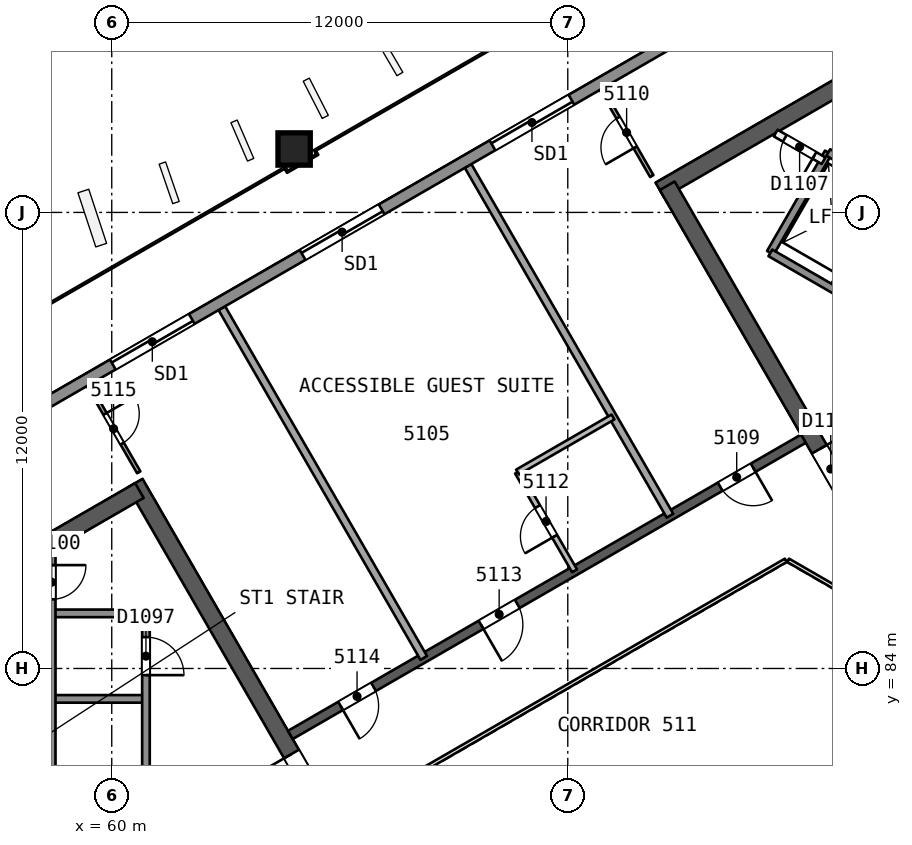
"""IFC4 building model, lengths in metres.
Left out: names, types, materials, properties, quantities, classifications, styles, units other than length and angle.
Written with IfcOpenShell. Run it as: python <this file> out.ifc"""

import sys

from ifc_helpers import new_model, si_unit, direction, frame, frame_2d, origin, origin_2d, place, context, subcontext, project, spatial, rectangle, extrude, element, fill, save


model = new_model("IFC4")
c1 = context("Model", 3, precision=1e-05, world=origin(), true_north=direction((0.0, 1.0)))
c2 = subcontext(c1, "Body", "Model", "MODEL_VIEW")
j1 = project(units=[si_unit("LENGTHUNIT", "METRE"), si_unit("PLANEANGLEUNIT", "RADIAN")], contexts=[c1])
p1 = place(None, origin())
s1 = spatial("IfcSite", under=j1, at=p1, CompositionType="ELEMENT")
p2 = place(p1, origin())
s2 = spatial("IfcBuilding", under=s1, at=p2, CompositionType="ELEMENT")
p3 = place(p2, frame((0.0, 0.0, 209.5)))
s3 = spatial("IfcBuildingStorey", under=s2, at=p3, CompositionType="ELEMENT", Elevation=209.5)
p4 = place(p3, frame((65.74, 80.0, 0.0), z_axis=(0.0, 0.0, 1.0), x_axis=(-0.499991857942, 0.866030104553, 0.0)))
e1 = element("IfcWall", 1, at=p4, inside=s3, PredefinedType="SHEAR", context=c2, shape_type="SweptSolid", body=[
    extrude(rectangle(XDim=10.25, YDim=0.45, at=frame_2d((5.125, 0.0))), origin(), (0.0, 0.0, 1.0), 3.7),
])
p5 = place(p4, frame((0.82, 0.0, 0.0)))
e2 = element("IfcOpeningElement", 2, at=p5, cuts=e1, PredefinedType="OPENING", context=c2, shape_type="SweptSolid", body=[
    extrude(rectangle(XDim=1.2, YDim=2.1, at=frame_2d((0.6, 1.05))), frame((0.0, 0.235, 0.0), z_axis=(0.0, -1.0, 0.0), x_axis=(1.0, 0.0, 0.0)), (0.0, 0.0, 1.0), 0.471),
])
p6 = place(p3, frame((60.728, 88.682, 0.0), z_axis=(0.0, 0.0, 1.0), x_axis=(-0.866021613849, -0.500006564303, 0.0)))
e3 = element("IfcWall", 3, at=p6, inside=s3, PredefinedType="SHEAR", context=c2, shape_type="SweptSolid", body=[
    extrude(rectangle(XDim=14.108, YDim=0.45, at=frame_2d((7.054, 0.0))), origin(), (0.0, 0.0, 1.0), 3.7),
])
p7 = place(p3, frame((86.723, 103.69, 0.0), z_axis=(0.0, 0.0, 1.0), x_axis=(-0.866022713978, -0.500004658852, 0.0)))
e4 = element("IfcWall", 4, at=p7, inside=s3, PredefinedType="SHEAR", context=c2, shape_type="SweptSolid", body=[
    extrude(rectangle(XDim=14.203, YDim=0.45, at=frame_2d((7.102, 0.0))), origin(), (0.0, 0.0, 1.0), 3.7),
])
p8 = place(p3, frame((74.617, 96.701, 0.0), z_axis=(0.0, 0.0, 1.0), x_axis=(0.499994385119, -0.866028645513, 0.0)))
e5 = element("IfcWall", 5, at=p8, inside=s3, PredefinedType="SHEAR", context=c2, shape_type="SweptSolid", body=[
    extrude(rectangle(XDim=10.155, YDim=0.45, at=frame_2d((5.077, 0.0))), origin(), (0.0, 0.0, 1.0), 3.7),
])
p9 = place(p8, frame((8.005, 0.0, 0.0)))
e6 = element("IfcOpeningElement", 6, at=p9, cuts=e5, PredefinedType="OPENING", context=c2, shape_type="SweptSolid", body=[
    extrude(rectangle(XDim=1.2, YDim=2.1, at=frame_2d((0.6, 1.05))), frame((0.0, 0.235, 0.0), z_axis=(0.0, -1.0, 0.0), x_axis=(1.0, 0.0, 0.0)), (0.0, 0.0, 1.0), 0.471),
])
p10 = place(p3, frame((78.2, 90.046, 0.0), z_axis=(0.0, 0.0, 1.0), x_axis=(-0.866026492143, -0.499998114903, 0.0)))
e7 = element("IfcWall", 7, at=p10, inside=s3, PredefinedType="SHEAR", context=c2, shape_type="SweptSolid", body=[
    extrude(rectangle(XDim=15.588, YDim=0.25, at=frame_2d((7.794, 0.0))), origin(), (0.0, 0.0, 1.0), 3.3),
])
p11 = place(p10, frame((1.527, 0.0, 0.0)))
e8 = element("IfcOpeningElement", 8, at=p11, cuts=e7, PredefinedType="OPENING", context=c2, shape_type="SweptSolid", body=[
    extrude(rectangle(XDim=1.0, YDim=2.1, at=frame_2d((0.5, 1.05))), frame((0.0, 0.135, 0.0), z_axis=(0.0, -1.0, 0.0), x_axis=(1.0, 0.0, 0.0)), (0.0, 0.0, 1.0), 0.271),
])
p12 = place(p10, frame((8.694, 0.0, 0.0)))
e9 = element("IfcOpeningElement", 9, at=p12, cuts=e7, PredefinedType="OPENING", context=c2, shape_type="SweptSolid", body=[
    extrude(rectangle(XDim=1.1, YDim=2.1, at=frame_2d((0.55, 1.05))), frame((0.0, 0.135, 0.0), z_axis=(0.0, -1.0, 0.0), x_axis=(1.0, 0.0, 0.0)), (0.0, 0.0, 1.0), 0.271),
])
p13 = place(p10, frame((13.062, 0.0, 0.0)))
e10 = element("IfcOpeningElement", 10, at=p13, cuts=e7, PredefinedType="OPENING", context=c2, shape_type="SweptSolid", body=[
    extrude(rectangle(XDim=1.0, YDim=2.1, at=frame_2d((0.5, 1.05))), frame((0.0, 0.135, 0.0), z_axis=(0.0, -1.0, 0.0), x_axis=(1.0, 0.0, 0.0)), (0.0, 0.0, 1.0), 0.271),
])
p14 = place(p3, frame((64.787, 97.689, 0.0), z_axis=(0.010093620709, -0.017482414954, 0.999796221231), x_axis=(-0.499897086036, 0.865849517735, 0.020187025824)))
e11 = element("IfcColumn", 11, at=p14, inside=s3, PredefinedType="COLUMN", context=c2, shape_type="SweptSolid", body=[
    extrude(rectangle(XDim=0.85, YDim=0.85, at=origin_2d()), origin(), (0.0, 0.0, 1.0), 3.701),
])
p15 = place(p3, frame((74.21, 96.956, 0.0), z_axis=(0.0, 0.0, 1.0), x_axis=(-0.49995654735, 0.86605048973, 0.0)))
e12 = element("IfcWall", 12, at=p15, inside=s3, PredefinedType="PARTITIONING", context=c2, shape_type="SweptSolid", body=[
    extrude(rectangle(XDim=2.648, YDim=0.1, at=frame_2d((1.324, 0.0))), origin(), (0.0, 0.0, 1.0), 3.3),
])
p16 = place(p15, frame((0.874, 0.0, 0.0)))
e13 = element("IfcOpeningElement", 13, at=p16, cuts=e12, PredefinedType="OPENING", context=c2, shape_type="SweptSolid", body=[
    extrude(rectangle(XDim=0.9, YDim=2.1, at=frame_2d((0.45, 1.05))), frame((0.0, 0.061, 0.0), z_axis=(0.0, -1.0, 0.0), x_axis=(1.0, 0.0, 0.0)), (0.0, 0.0, 1.0), 0.121),
])
p17 = place(p3, frame((69.376, 97.223, 0.0), z_axis=(0.0, 0.0, 1.0), x_axis=(0.499993571489, -0.866029115255, 0.0)))
e14 = element("IfcWall", 14, at=p17, inside=s3, PredefinedType="PARTITIONING", context=c2, shape_type="SweptSolid", body=[
    extrude(rectangle(XDim=10.627, YDim=0.2, at=frame_2d((5.313, 0.0))), origin(), (0.0, 0.0, 1.0), 3.3),
])
p18 = place(p3, frame((72.178, 86.569, 0.0), z_axis=(0.0, 0.0, 1.0), x_axis=(-0.499990139034, 0.866031096941, 0.0)))
e15 = element("IfcWall", 15, at=p18, inside=s3, PredefinedType="PARTITIONING", context=c2, shape_type="SweptSolid", body=[
    extrude(rectangle(XDim=3.0, YDim=0.15, at=frame_2d((1.5, 0.0))), origin(), (0.0, 0.0, 1.0), 3.3),
])
p19 = place(p18, frame((1.05, 0.0, 0.0)))
e16 = element("IfcOpeningElement", 16, at=p19, cuts=e15, PredefinedType="OPENING", context=c2, shape_type="SweptSolid", body=[
    extrude(rectangle(XDim=0.9, YDim=2.1, at=frame_2d((0.45, 1.05))), frame((0.0, 0.085, 0.0), z_axis=(0.0, -1.0, 0.0), x_axis=(1.0, 0.0, 0.0)), (0.0, 0.0, 1.0), 0.171),
])
p20 = place(p3, frame((70.678, 89.167, 0.0), z_axis=(0.0, 0.0, 1.0), x_axis=(0.866032775405, 0.499987231761, 0.0)))
e17 = element("IfcWall", 17, at=p20, inside=s3, PredefinedType="PARTITIONING", context=c2, shape_type="SweptSolid", body=[
    extrude(rectangle(XDim=2.9, YDim=0.15, at=frame_2d((1.45, 0.0))), origin(), (0.0, 0.0, 1.0), 3.3),
])
p21 = place(p3, frame((62.896, 93.481, 0.0), z_axis=(0.0, 0.0, 1.0), x_axis=(0.499993571489, -0.866029115255, 0.0)))
e18 = element("IfcWall", 18, at=p21, inside=s3, PredefinedType="PARTITIONING", context=c2, shape_type="SweptSolid", body=[
    extrude(rectangle(XDim=10.627, YDim=0.2, at=frame_2d((5.313, 0.0))), origin(), (0.0, 0.0, 1.0), 3.3),
])
p22 = place(p3, frame((59.386, 91.455, 0.0), z_axis=(0.0, 0.0, 1.0), x_axis=(0.49995654735, -0.86605048973, 0.0)))
e19 = element("IfcWall", 19, at=p22, inside=s3, PredefinedType="PARTITIONING", context=c2, shape_type="SweptSolid", body=[
    extrude(rectangle(XDim=2.648, YDim=0.1, at=frame_2d((1.324, 0.0))), origin(), (0.0, 0.0, 1.0), 3.3),
])
p23 = place(p22, frame((0.874, 0.0, 0.0)))
e20 = element("IfcOpeningElement", 20, at=p23, cuts=e19, PredefinedType="OPENING", context=c2, shape_type="SweptSolid", body=[
    extrude(rectangle(XDim=0.9, YDim=2.1, at=frame_2d((0.45, 1.05))), frame((0.0, 0.061, 0.0), z_axis=(0.0, -1.0, 0.0), x_axis=(1.0, 0.0, 0.0)), (0.0, 0.0, 1.0), 0.121),
])
p24 = place(p3, frame((43.802, 82.63, 0.0), z_axis=(0.0, 0.0, 1.0), x_axis=(0.866026224187, 0.499998579018, 0.0)))
e21 = element("IfcWall", 21, at=p24, inside=s3, PredefinedType="SOLIDWALL", context=c2, shape_type="SweptSolid", body=[
    extrude(rectangle(XDim=51.406, YDim=0.3, at=frame_2d((25.703, 0.0))), origin(), (0.0, 0.0, 1.0), 3.3),
])
p25 = place(p24, frame((24.503, 0.0, 0.0)))
e22 = element("IfcOpeningElement", 22, at=p25, cuts=e21, PredefinedType="OPENING", context=c2, shape_type="SweptSolid", body=[
    extrude(rectangle(XDim=2.4, YDim=2.4, at=frame_2d((1.2, 1.2))), frame((0.0, 0.161, 0.0), z_axis=(0.0, -1.0, 0.0), x_axis=(1.0, 0.0, 0.0)), (0.0, 0.0, 1.0), 0.321),
])
p26 = place(p24, frame((30.271, 0.0, 0.0)))
e23 = element("IfcOpeningElement", 23, at=p26, cuts=e21, PredefinedType="OPENING", context=c2, shape_type="SweptSolid", body=[
    extrude(rectangle(XDim=2.4, YDim=2.4, at=frame_2d((1.2, 1.2))), frame((0.0, 0.161, 0.0), z_axis=(0.0, -1.0, 0.0), x_axis=(1.0, 0.0, 0.0)), (0.0, 0.0, 1.0), 0.321),
])
p27 = place(p24, frame((39.983, 0.0, 0.0)))
e24 = element("IfcOpeningElement", 24, at=p27, cuts=e21, PredefinedType="OPENING", context=c2, shape_type="SweptSolid", body=[
    extrude(rectangle(XDim=2.4, YDim=2.4, at=frame_2d((1.2, 1.2))), frame((0.0, 0.161, 0.0), z_axis=(0.0, -1.0, 0.0), x_axis=(1.0, 0.0, 0.0)), (0.0, 0.0, 1.0), 0.321),
])
p28 = place(p24, frame((18.736, 0.0, 0.0)))
e25 = element("IfcOpeningElement", 25, at=p28, cuts=e21, PredefinedType="OPENING", context=c2, shape_type="SweptSolid", body=[
    extrude(rectangle(XDim=2.4, YDim=2.4, at=frame_2d((1.2, 1.2))), frame((0.0, 0.161, 0.0), z_axis=(0.0, -1.0, 0.0), x_axis=(1.0, 0.0, 0.0)), (0.0, 0.0, 1.0), 0.321),
])
p29 = place(p24, frame((9.0, 0.0, 0.0)))
e26 = element("IfcOpeningElement", 26, at=p29, cuts=e21, PredefinedType="OPENING", context=c2, shape_type="SweptSolid", body=[
    extrude(rectangle(XDim=2.4, YDim=2.4, at=frame_2d((1.2, 1.2))), frame((0.0, 0.161, 0.0), z_axis=(0.0, -1.0, 0.0), x_axis=(1.0, 0.0, 0.0)), (0.0, 0.0, 1.0), 0.321),
])
for number, where, z_axis, x_axis in (
    (27, (60.9, 85.45, 0.0), (0.0, 0.0, 1.0), (-1.0, 0.0, 0.0)),
    (28, (60.9, 83.2, 0.0), (0.0, 0.0, 1.0), (-1.0, 0.0, 0.0)),
):
    element("IfcWall", number, at=place(p3, frame(where, z_axis=z_axis, x_axis=x_axis)), inside=s3, PredefinedType="SOLIDWALL", context=c2, shape_type="SweptSolid", body=[
        extrude(rectangle(XDim=2.48, YDim=0.2, at=frame_2d((1.24, 0.0))), origin(), (0.0, 0.0, 1.0), 3.3),
    ])
p30 = place(p3, frame((60.9, 85.45, 0.0), z_axis=(0.0, 0.0, 1.0), x_axis=(0.0, -1.0, 0.0)))
e29 = element("IfcWall", 29, at=p30, inside=s3, PredefinedType="SOLIDWALL", context=c2, shape_type="SweptSolid", body=[
    extrude(rectangle(XDim=10.9, YDim=0.2, at=frame_2d((5.45, 0.0))), origin(), (0.0, 0.0, 1.0), 3.3),
])
p31 = place(p30, frame((0.625, 0.0, 0.0)))
e30 = element("IfcOpeningElement", 30, at=p31, cuts=e29, PredefinedType="OPENING", context=c2, shape_type="SweptSolid", body=[
    extrude(rectangle(XDim=1.0, YDim=2.1, at=frame_2d((0.5, 1.05))), frame((0.0, 0.11, 0.0), z_axis=(0.0, -1.0, 0.0), x_axis=(1.0, 0.0, 0.0)), (0.0, 0.0, 1.0), 0.221),
])
p32 = place(p30, frame((5.125, 0.0, 0.0)))
e31 = element("IfcOpeningElement", 31, at=p32, cuts=e29, PredefinedType="OPENING", context=c2, shape_type="SweptSolid", body=[
    extrude(rectangle(XDim=1.0, YDim=2.1, at=frame_2d((0.5, 1.05))), frame((0.0, 0.11, 0.0), z_axis=(0.0, -1.0, 0.0), x_axis=(1.0, 0.0, 0.0)), (0.0, 0.0, 1.0), 0.221),
])
p33 = place(p3, frame((58.42, 87.09, 0.0), z_axis=(0.0, 0.0, 1.0), x_axis=(0.0, -1.0, 0.0)))
e32 = element("IfcWall", 32, at=p33, inside=s3, PredefinedType="SOLIDWALL", context=c2, shape_type="SweptSolid", body=[
    extrude(rectangle(XDim=10.64, YDim=0.2, at=frame_2d((5.32, 0.0))), origin(), (0.0, 0.0, 1.0), 3.3),
])
p34 = place(p33, frame((0.37, 0.0, 0.0)))
e33 = element("IfcOpeningElement", 33, at=p34, cuts=e32, PredefinedType="OPENING", context=c2, shape_type="SweptSolid", body=[
    extrude(rectangle(XDim=0.9, YDim=2.1, at=frame_2d((0.45, 1.05))), frame((0.0, 0.11, 0.0), z_axis=(0.0, -1.0, 0.0), x_axis=(1.0, 0.0, 0.0)), (0.0, 0.0, 1.0), 0.221),
])
for number, where, z_axis, x_axis in (
    (34, (78.976, 93.986, 0.0), (0.0, 0.0, 1.0), (0.5, 0.866, 0.0)),
    (35, (77.33, 94.936, 0.0), (0.0, 0.0, 1.0), (0.5, 0.866, 0.0)),
):
    element("IfcWall", number, at=place(p3, frame(where, z_axis=z_axis, x_axis=x_axis)), inside=s3, PredefinedType="SOLIDWALL", context=c2, shape_type="SweptSolid", body=[
        extrude(rectangle(XDim=3.05, YDim=0.2, at=frame_2d((1.525, 0.0))), origin(), (0.0, 0.0, 1.0), 3.3),
    ])
p35 = place(p3, frame((86.77, 89.486, 0.0), z_axis=(0.0, 0.0, 1.0), x_axis=(-0.86601811187, 0.500012629753, 0.0)))
e36 = element("IfcWall", 36, at=p35, inside=s3, PredefinedType="SOLIDWALL", context=c2, shape_type="SweptSolid", body=[
    extrude(rectangle(XDim=10.9, YDim=0.2, at=frame_2d((5.45, 0.0))), origin(), (0.0, 0.0, 1.0), 3.3),
])
p36 = place(p35, frame((2.875, 0.0, 0.0)))
e37 = element("IfcOpeningElement", 37, at=p36, cuts=e36, PredefinedType="OPENING", context=c2, shape_type="SweptSolid", body=[
    extrude(rectangle(XDim=1.0, YDim=2.1, at=frame_2d((0.5, 1.05))), frame((0.0, 0.11, 0.0), z_axis=(0.0, -1.0, 0.0), x_axis=(1.0, 0.0, 0.0)), (0.0, 0.0, 1.0), 0.221),
])
p37 = place(p35, frame((7.375, 0.0, 0.0)))
e38 = element("IfcOpeningElement", 38, at=p37, cuts=e36, PredefinedType="OPENING", context=c2, shape_type="SweptSolid", body=[
    extrude(rectangle(XDim=1.0, YDim=2.1, at=frame_2d((0.5, 1.05))), frame((0.0, 0.11, 0.0), z_axis=(0.0, -1.0, 0.0), x_axis=(1.0, 0.0, 0.0)), (0.0, 0.0, 1.0), 0.221),
])
p38 = place(p3, frame((78.73, 97.361, 0.0), z_axis=(0.0, 0.0, 1.0), x_axis=(-0.866045896294, 0.499964504253, 0.0)))
e39 = element("IfcWall", 39, at=p38, inside=s3, PredefinedType="PARTITIONING", context=c2, shape_type="SweptSolid", body=[
    extrude(rectangle(XDim=1.455, YDim=0.2, at=frame_2d((0.728, 0.0))), origin(), (0.0, 0.0, 1.0), 3.3),
])
p39 = place(p38, frame((0.278, 0.0, 0.0)))
e40 = element("IfcOpeningElement", 40, at=p39, cuts=e39, PredefinedType="OPENING", context=c2, shape_type="SweptSolid", body=[
    extrude(rectangle(XDim=0.9, YDim=2.1, at=frame_2d((0.45, 1.05))), frame((0.0, 0.11, 0.0), z_axis=(0.0, -1.0, 0.0), x_axis=(1.0, 0.0, 0.0)), (0.0, 0.0, 1.0), 0.221),
])
p40 = place(p3, frame((80.5, 96.627, 0.0), z_axis=(0.0, 0.0, 1.0), x_axis=(-0.86601224135, 0.500022797313, 0.0)))
e41 = element("IfcWall", 41, at=p40, inside=s3, PredefinedType="SOLIDWALL", context=c2, shape_type="SweptSolid", body=[
    extrude(rectangle(XDim=1.9, YDim=0.2, at=frame_2d((0.95, 0.0))), origin(), (0.0, 0.0, 1.0), 3.3),
])
p41 = place(p40, frame((0.4, 0.0, 0.0)))
e42 = element("IfcOpeningElement", 42, at=p41, cuts=e41, PredefinedType="OPENING", context=c2, shape_type="SweptSolid", body=[
    extrude(rectangle(XDim=1.1, YDim=2.1, at=frame_2d((0.55, 1.05))), frame((0.0, 0.11, 0.0), z_axis=(0.0, -1.0, 0.0), x_axis=(1.0, 0.0, 0.0)), (0.0, 0.0, 1.0), 0.221),
])
p42 = place(p3, frame((79.53, 85.846, 0.0), z_axis=(0.0, 0.0, 1.0), x_axis=(-0.866041268327, 0.499972520799, 0.0)))
e43 = element("IfcWall", 43, at=p42, inside=s3, PredefinedType="PARTITIONING", context=c2, shape_type="SweptSolid", body=[
    extrude(rectangle(XDim=2.0, YDim=0.1, at=frame_2d((1.0, 0.0))), origin(), (0.0, 0.0, 1.0), 3.3),
])
p43 = place(p3, frame((77.738, 86.846, 0.0), z_axis=(0.0, 0.0, 1.0), x_axis=(-0.866026658274, -0.499997827154, 0.0)))
e44 = element("IfcWall", 44, at=p43, inside=s3, PredefinedType="PARTITIONING", context=c2, shape_type="SweptSolid", body=[
    extrude(rectangle(XDim=11.588, YDim=0.1, at=frame_2d((5.794, 0.0))), origin(), (0.0, 0.0, 1.0), 3.3),
])
p44 = place(p11, origin())
e45 = element("IfcDoor", 45, at=p44, inside=s3, OperationType="SINGLE_SWING_LEFT", PredefinedType="NOTDEFINED", context=c2, shape_type="SweptSolid", body=[
    extrude(rectangle(XDim=1.0, YDim=2.1, at=frame_2d((0.5, 1.05))), frame((0.0, 0.025, 0.0), z_axis=(0.0, -1.0, 0.0), x_axis=(1.0, 0.0, 0.0)), (0.0, 0.0, 1.0), 0.05),
])
fill(e8, e45)
p45 = place(p16, origin())
e46 = element("IfcDoor", 46, at=p45, inside=s3, OperationType="SINGLE_SWING_LEFT", PredefinedType="NOTDEFINED", context=c2, shape_type="SweptSolid", body=[
    extrude(rectangle(XDim=0.9, YDim=2.1, at=frame_2d((0.45, 1.05))), frame((0.0, 0.025, 0.0), z_axis=(0.0, -1.0, 0.0), x_axis=(1.0, 0.0, 0.0)), (0.0, 0.0, 1.0), 0.05),
])
fill(e13, e46)
p46 = place(p19, origin())
e47 = element("IfcDoor", 47, at=p46, inside=s3, OperationType="SINGLE_SWING_LEFT", PredefinedType="NOTDEFINED", context=c2, shape_type="SweptSolid", body=[
    extrude(rectangle(XDim=0.9, YDim=2.1, at=frame_2d((0.45, 1.05))), frame((0.0, 0.025, 0.0), z_axis=(0.0, -1.0, 0.0), x_axis=(1.0, 0.0, 0.0)), (0.0, 0.0, 1.0), 0.05),
])
fill(e16, e47)
p47 = place(p12, origin())
e48 = element("IfcDoor", 48, at=p47, inside=s3, OperationType="SINGLE_SWING_RIGHT", PredefinedType="NOTDEFINED", context=c2, shape_type="SweptSolid", body=[
    extrude(rectangle(XDim=1.1, YDim=2.1, at=frame_2d((0.55, 1.05))), frame((0.0, 0.025, 0.0), z_axis=(0.0, -1.0, 0.0), x_axis=(1.0, 0.0, 0.0)), (0.0, 0.0, 1.0), 0.05),
])
fill(e9, e48)
p48 = place(p13, origin())
e49 = element("IfcDoor", 49, at=p48, inside=s3, OperationType="SINGLE_SWING_RIGHT", PredefinedType="NOTDEFINED", context=c2, shape_type="SweptSolid", body=[
    extrude(rectangle(XDim=1.0, YDim=2.1, at=frame_2d((0.5, 1.05))), frame((0.0, 0.025, 0.0), z_axis=(0.0, -1.0, 0.0), x_axis=(1.0, 0.0, 0.0)), (0.0, 0.0, 1.0), 0.05),
])
fill(e10, e49)
p49 = place(p23, origin())
e50 = element("IfcDoor", 50, at=p49, inside=s3, OperationType="SINGLE_SWING_LEFT", PredefinedType="NOTDEFINED", context=c2, shape_type="SweptSolid", body=[
    extrude(rectangle(XDim=0.9, YDim=2.1, at=frame_2d((0.45, 1.05))), frame((0.0, 0.025, 0.0), z_axis=(0.0, -1.0, 0.0), x_axis=(1.0, 0.0, 0.0)), (0.0, 0.0, 1.0), 0.05),
])
fill(e20, e50)
p50 = place(p25, origin())
e51 = element("IfcDoor", 51, at=p50, inside=s3, OperationType="SLIDING_TO_LEFT", PredefinedType="NOTDEFINED", context=c2, shape_type="SweptSolid", body=[
    extrude(rectangle(XDim=2.4, YDim=2.4, at=frame_2d((1.2, 1.2))), frame((0.0, 0.025, 0.0), z_axis=(0.0, -1.0, 0.0), x_axis=(1.0, 0.0, 0.0)), (0.0, 0.0, 1.0), 0.05),
])
fill(e22, e51)
p51 = place(p26, origin())
e52 = element("IfcDoor", 52, at=p51, inside=s3, OperationType="SLIDING_TO_RIGHT", PredefinedType="NOTDEFINED", context=c2, shape_type="SweptSolid", body=[
    extrude(rectangle(XDim=2.4, YDim=2.4, at=frame_2d((1.2, 1.2))), frame((0.0, 0.025, 0.0), z_axis=(0.0, -1.0, 0.0), x_axis=(1.0, 0.0, 0.0)), (0.0, 0.0, 1.0), 0.05),
])
fill(e23, e52)
p52 = place(p28, origin())
e53 = element("IfcDoor", 53, at=p52, inside=s3, OperationType="SLIDING_TO_RIGHT", PredefinedType="NOTDEFINED", context=c2, shape_type="SweptSolid", body=[
    extrude(rectangle(XDim=2.4, YDim=2.4, at=frame_2d((1.2, 1.2))), frame((0.0, 0.025, 0.0), z_axis=(0.0, -1.0, 0.0), x_axis=(1.0, 0.0, 0.0)), (0.0, 0.0, 1.0), 0.05),
])
fill(e25, e53)
p53 = place(p5, origin())
e54 = element("IfcDoor", 54, at=p53, inside=s3, OperationType="SINGLE_SWING_RIGHT", PredefinedType="NOTDEFINED", context=c2, shape_type="SweptSolid", body=[
    extrude(rectangle(XDim=1.2, YDim=2.1, at=frame_2d((0.6, 1.05))), frame((0.0, 0.025, 0.0), z_axis=(0.0, -1.0, 0.0), x_axis=(1.0, 0.0, 0.0)), (0.0, 0.0, 1.0), 0.05),
])
fill(e2, e54)
p54 = place(p31, origin())
e55 = element("IfcDoor", 55, at=p54, inside=s3, OperationType="SINGLE_SWING_RIGHT", PredefinedType="NOTDEFINED", context=c2, shape_type="SweptSolid", body=[
    extrude(rectangle(XDim=1.0, YDim=2.1, at=frame_2d((0.5, 1.05))), frame((0.0, 0.025, 0.0), z_axis=(0.0, -1.0, 0.0), x_axis=(1.0, 0.0, 0.0)), (0.0, 0.0, 1.0), 0.05),
])
fill(e30, e55)
p55 = place(p34, origin())
e56 = element("IfcDoor", 56, at=p55, inside=s3, OperationType="SINGLE_SWING_LEFT", PredefinedType="NOTDEFINED", context=c2, shape_type="SweptSolid", body=[
    extrude(rectangle(XDim=0.9, YDim=2.1, at=frame_2d((0.45, 1.05))), frame((0.0, 0.025, 0.0), z_axis=(0.0, -1.0, 0.0), x_axis=(1.0, 0.0, 0.0)), (0.0, 0.0, 1.0), 0.05),
])
fill(e33, e56)
p56 = place(p9, origin())
e57 = element("IfcDoor", 57, at=p56, inside=s3, OperationType="SINGLE_SWING_LEFT", PredefinedType="NOTDEFINED", context=c2, shape_type="SweptSolid", body=[
    extrude(rectangle(XDim=1.2, YDim=2.1, at=frame_2d((0.6, 1.05))), frame((0.0, 0.025, 0.0), z_axis=(0.0, -1.0, 0.0), x_axis=(1.0, 0.0, 0.0)), (0.0, 0.0, 1.0), 0.05),
])
fill(e6, e57)
p57 = place(p39, origin())
e58 = element("IfcDoor", 58, at=p57, inside=s3, OperationType="SINGLE_SWING_LEFT", PredefinedType="NOTDEFINED", context=c2, shape_type="SweptSolid", body=[
    extrude(rectangle(XDim=0.9, YDim=2.1, at=frame_2d((0.45, 1.05))), frame((0.0, 0.025, 0.0), z_axis=(0.0, -1.0, 0.0), x_axis=(1.0, 0.0, 0.0)), (0.0, 0.0, 1.0), 0.05),
])
fill(e40, e58)
save(model, sys.argv[1])
